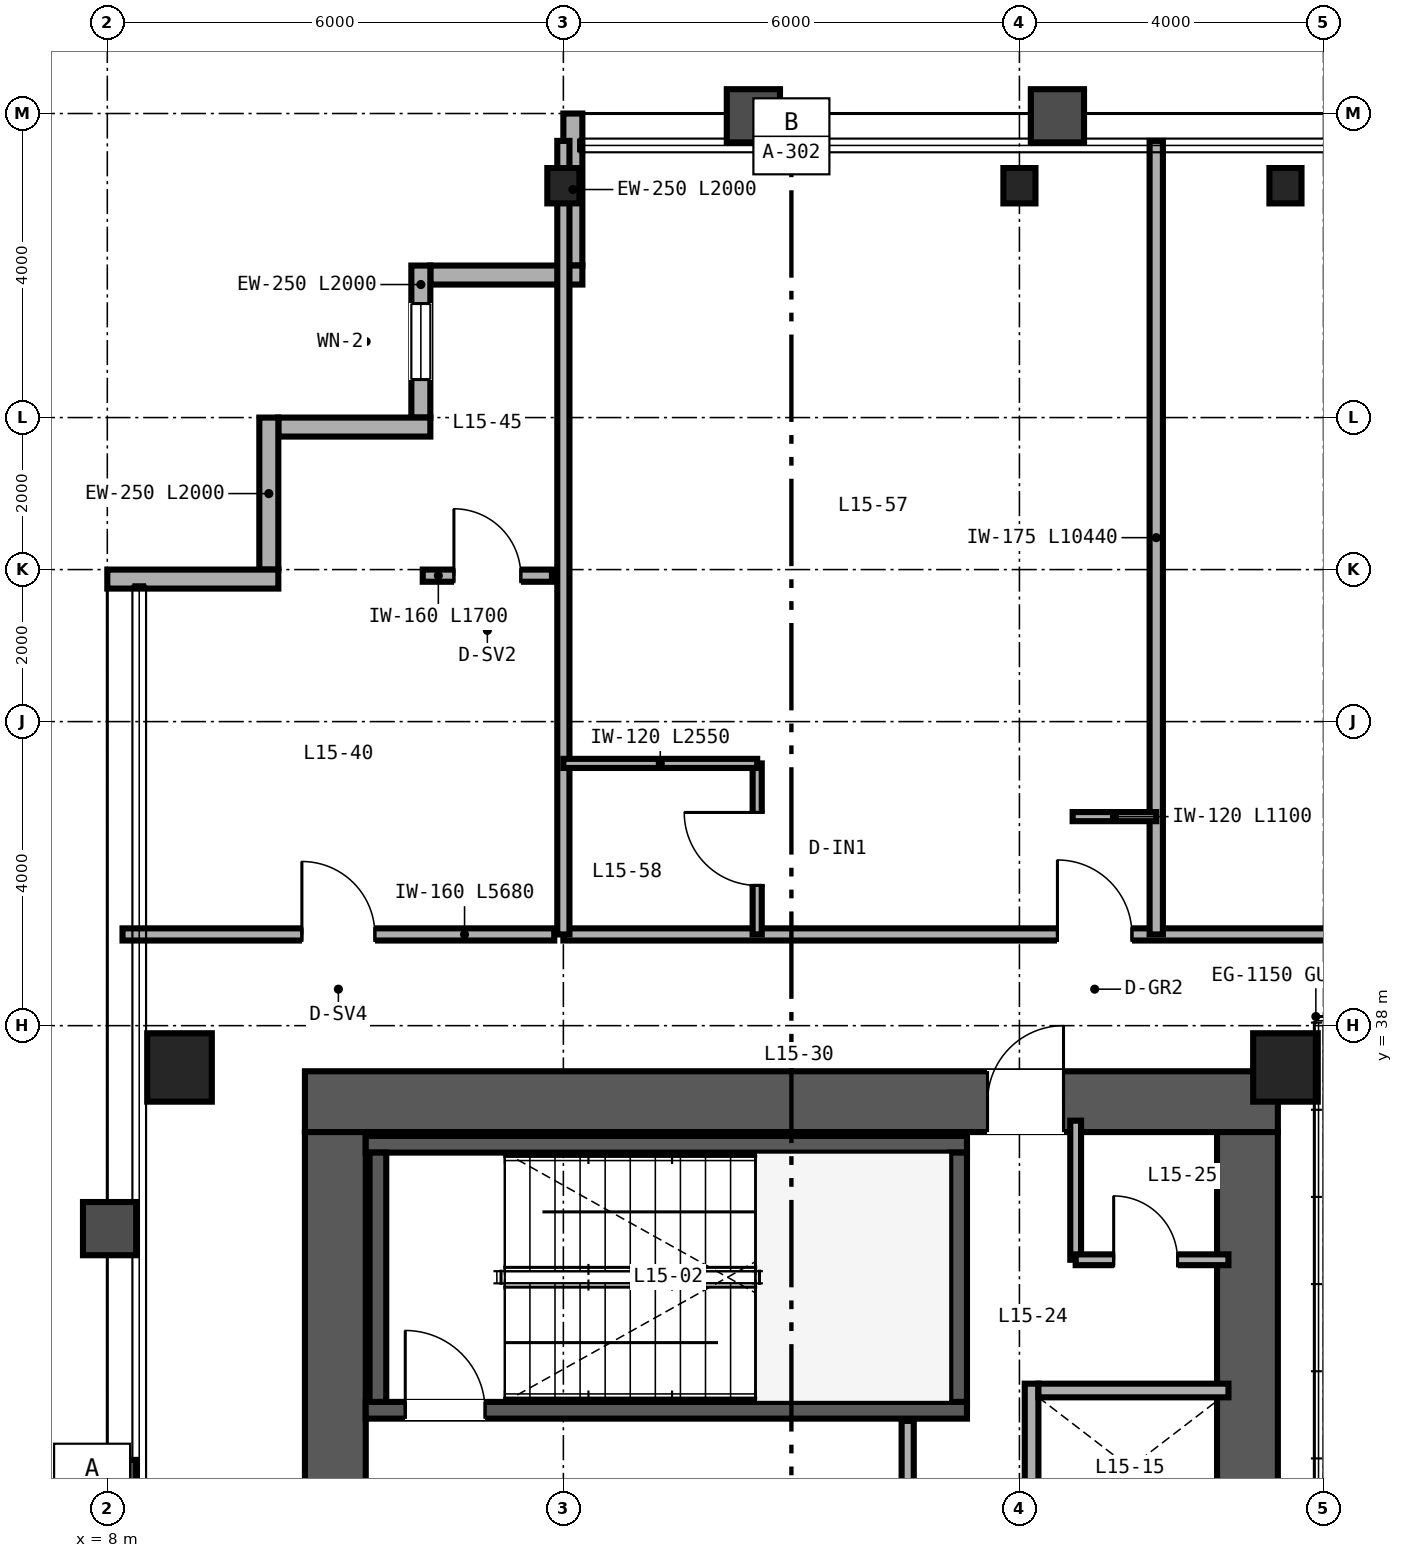
"""IFC4 building model, lengths in metres.
Left out: names, types, materials, properties, quantities, classifications, styles, units other than length and angle.
Written with IfcOpenShell. Run it as: python <this file> out.ifc"""

import sys

from ifc_helpers import new_model, si_unit, direction, frame, frame_2d, origin, origin_2d, place, context, subcontext, project, spatial, rectangle, hollow_rectangle, i_section, extrude, source, transform, mapped, element, fill, save


model = new_model("IFC4")
c1 = context("Model", 3, precision=1e-05, world=origin(), true_north=direction((0.0, 1.0)))
c2 = subcontext(c1, "Body", "Model", "MODEL_VIEW")
j1 = project(units=[si_unit("LENGTHUNIT", "METRE"), si_unit("PLANEANGLEUNIT", "RADIAN")], contexts=[c1])
p1 = place(None, origin())
s1 = spatial("IfcSite", under=j1, at=p1, CompositionType="ELEMENT")
p2 = place(p1, origin())
s2 = spatial("IfcBuilding", under=s1, at=p2, CompositionType="ELEMENT")
p3 = place(p2, frame((0.0, 0.0, 63.6)))
s3 = spatial("IfcBuildingStorey", under=s2, at=p3, CompositionType="ELEMENT", Elevation=63.6)
p4 = place(p3, frame((10.6, 37.0, 0.0), z_axis=(0.0, 0.0, 1.0), x_axis=(1.0, 0.0, 0.0)))
e1 = element("IfcWall", 1, at=p4, inside=s3, PredefinedType="SHEAR", context=c2, shape_type="SweptSolid", body=[
    extrude(rectangle(XDim=12.8, YDim=0.8, at=frame_2d((6.4, 0.0))), origin(), (0.0, 0.0, 1.0), 3.35),
])
p5 = place(p4, frame((8.98, 0.0, 0.0)))
e2 = element("IfcOpeningElement", 2, at=p5, cuts=e1, PredefinedType="OPENING", context=c2, shape_type="SweptSolid", body=[
    extrude(rectangle(XDim=1.0, YDim=2.15, at=frame_2d((0.5, 1.075))), frame((0.0, 0.41, 0.0), z_axis=(0.0, -1.0, 0.0), x_axis=(1.0, 0.0, 0.0)), (0.0, 0.0, 1.0), 0.82),
])
for number, where, z_axis, x_axis in (
    (3, (11.0, 15.4, 0.0), (0.0, 0.0, 1.0), (0.0, 1.0, 0.0)),
    (4, (23.0, 15.4, 0.0), (0.0, 0.0, 1.0), (0.0, 1.0, 0.0)),
):
    element("IfcWall", number, at=place(p3, frame(where, z_axis=z_axis, x_axis=x_axis)), inside=s3, PredefinedType="SHEAR", context=c2, shape_type="SweptSolid", body=[
        extrude(rectangle(XDim=21.2, YDim=0.8, at=frame_2d((10.6, 0.0))), origin(), (0.0, 0.0, 1.0), 3.35),
    ])
p6 = place(p3, frame((11.4, 32.94, 0.0), z_axis=(0.0, 0.0, 1.0), x_axis=(1.0, 0.0, 0.0)))
e5 = element("IfcWall", 5, at=p6, inside=s3, PredefinedType="SHEAR", context=c2, shape_type="SweptSolid", body=[
    extrude(rectangle(XDim=7.91, YDim=0.22, at=frame_2d((3.955, 0.0))), origin(), (0.0, 0.0, 1.0), 3.4),
])
p7 = place(p6, frame((0.52, 0.0, 0.0)))
e6 = element("IfcOpeningElement", 6, at=p7, cuts=e5, PredefinedType="OPENING", context=c2, shape_type="SweptSolid", body=[
    extrude(rectangle(XDim=1.05, YDim=2.15, at=frame_2d((0.525, 1.075))), frame((0.0, 0.12, 0.0), z_axis=(0.0, -1.0, 0.0), x_axis=(1.0, 0.0, 0.0)), (0.0, 0.0, 1.0), 0.24),
])
p8 = place(p3, frame((11.4, 36.44, 0.0), z_axis=(0.0, 0.0, 1.0), x_axis=(1.0, 0.0, 0.0)))
e7 = element("IfcWall", 7, at=p8, inside=s3, PredefinedType="SHEAR", context=c2, shape_type="SweptSolid", body=[
    extrude(rectangle(XDim=7.91, YDim=0.22, at=frame_2d((3.955, 0.0))), origin(), (0.0, 0.0, 1.0), 3.4),
])
for number, where, z_axis, x_axis in (
    (8, (11.56, 33.05, 0.0), (0.0, 0.0, 1.0), (0.0, 1.0, 0.0)),
    (9, (19.2, 33.05, 0.0), (0.0, 0.0, 1.0), (0.0, 1.0, 0.0)),
):
    element("IfcWall", number, at=place(p3, frame(where, z_axis=z_axis, x_axis=x_axis)), inside=s3, PredefinedType="SHEAR", context=c2, shape_type="SweptSolid", body=[
        extrude(rectangle(XDim=3.28, YDim=0.22, at=frame_2d((1.64, 0.0))), origin(), (0.0, 0.0, 1.0), 3.4),
    ])
m1 = source(origin(), c2, "Body", "SweptSolid", [
    extrude(hollow_rectangle(XDim=0.85, YDim=0.9, WallThickness=0.04, at=origin_2d()), origin(), (0.0, 0.0, 1.0), 3.35),
])
for number, where, z_axis, x_axis in (
    (10, (8.95, 37.45, 0.0), (0.0, 0.0, 1.0), (1.0, 0.0, 0.0)),
    (11, (23.5, 37.45, 0.0), (0.0, 0.0, 1.0), (1.0, 0.0, 0.0)),
):
    element("IfcColumn", number, at=place(p3, frame(where, z_axis=z_axis, x_axis=x_axis)), inside=s3, PredefinedType="COLUMN", context=c2, shape_type="MappedRepresentation", body=[
        mapped(m1, transform((0.0, 0.0, 0.0), scale=1.0)),
    ])
m2 = source(origin(), c2, "Body", "SweptSolid", [
    extrude(i_section(OverallWidth=0.422, OverallDepth=0.465, WebThickness=0.045, FlangeThickness=0.073, FilletRadius=0.025, at=origin_2d()), origin(), (0.0, 0.0, 1.0), 3.35),
])
for number, where, z_axis, x_axis in (
    (12, (14.0, 49.05, 0.0), (0.0, 0.0, 1.0), (1.0, 0.0, 0.0)),
    (13, (20.0, 49.05, 0.0), (0.0, 0.0, 1.0), (1.0, 0.0, 0.0)),
    (14, (23.5, 49.05, 0.0), (0.0, 0.0, 1.0), (1.0, 0.0, 0.0)),
):
    element("IfcColumn", number, at=place(p3, frame(where, z_axis=z_axis, x_axis=x_axis)), inside=s3, PredefinedType="COLUMN", context=c2, shape_type="MappedRepresentation", body=[
        mapped(m2, transform((0.0, 0.0, 0.0), scale=1.0)),
    ])
p9 = place(p3, frame((14.125, 50.0, 0.0), z_axis=(0.0, 0.0, 1.0), x_axis=(0.0, -1.0, 0.0)))
e15 = element("IfcWall", 15, at=p9, inside=s3, PredefinedType="SOLIDWALL", context=c2, shape_type="SweptSolid", body=[
    extrude(rectangle(XDim=2.0, YDim=0.25, at=frame_2d((1.0, 0.0))), origin(), (0.0, 0.0, 1.0), 2.657),
])
p10 = place(p3, frame((14.25, 47.875, 0.0), z_axis=(0.0, 0.0, 1.0), x_axis=(-1.0, 0.0, 0.0)))
e16 = element("IfcWall", 16, at=p10, inside=s3, PredefinedType="SOLIDWALL", context=c2, shape_type="SweptSolid", body=[
    extrude(rectangle(XDim=2.0, YDim=0.25, at=frame_2d((1.0, 0.0))), origin(), (0.0, 0.0, 1.0), 3.35),
])
p11 = place(p3, frame((12.125, 48.0, 0.0), z_axis=(0.0, 0.0, 1.0), x_axis=(0.0, -1.0, 0.0)))
e17 = element("IfcWall", 17, at=p11, inside=s3, PredefinedType="SOLIDWALL", context=c2, shape_type="SweptSolid", body=[
    extrude(rectangle(XDim=2.0, YDim=0.25, at=frame_2d((1.0, 0.0))), origin(), (0.0, 0.0, 1.0), 3.35),
])
p12 = place(p11, frame((0.5, 0.0, 0.85)))
e18 = element("IfcOpeningElement", 18, at=p12, cuts=e17, PredefinedType="OPENING", context=c2, shape_type="SweptSolid", body=[
    extrude(rectangle(XDim=1.0, YDim=1.9, at=frame_2d((0.5, 0.95))), frame((0.0, 0.135, 0.0), z_axis=(0.0, -1.0, 0.0), x_axis=(1.0, 0.0, 0.0)), (0.0, 0.0, 1.0), 0.27),
])
for number, where, z_axis, x_axis in (
    (19, (12.25, 45.875, 0.0), (0.0, 0.0, 1.0), (-1.0, 0.0, 0.0)),
    (20, (10.125, 46.0, 0.0), (0.0, 0.0, 1.0), (0.0, -1.0, 0.0)),
):
    element("IfcWall", number, at=place(p3, frame(where, z_axis=z_axis, x_axis=x_axis)), inside=s3, PredefinedType="SOLIDWALL", context=c2, shape_type="SweptSolid", body=[
        extrude(rectangle(XDim=2.0, YDim=0.25, at=frame_2d((1.0, 0.0))), origin(), (0.0, 0.0, 1.0), 3.35),
    ])
p13 = place(p3, frame((10.25, 43.875, 0.0), z_axis=(0.0, 0.0, 1.0), x_axis=(-1.0, 0.0, 0.0)))
e21 = element("IfcWall", 21, at=p13, inside=s3, PredefinedType="SOLIDWALL", context=c2, shape_type="SweptSolid", body=[
    extrude(rectangle(XDim=2.25, YDim=0.25, at=frame_2d((1.125, 0.0))), origin(), (0.0, 0.0, 1.0), 3.35),
])
p14 = place(p3, frame((20.16, 29.0, 0.0), z_axis=(0.0, 0.0, 1.0), x_axis=(0.0, 1.0, 0.0)))
e22 = element("IfcWall", 22, at=p14, inside=s3, PredefinedType="SOLIDWALL", context=c2, shape_type="SweptSolid", body=[
    extrude(rectangle(XDim=4.29, YDim=0.18, at=frame_2d((2.145, 0.0))), origin(), (0.0, 0.0, 1.0), 3.35),
])
p15 = place(p3, frame((20.25, 33.2, 0.0), z_axis=(0.0, 0.0, 1.0), x_axis=(1.0, 0.0, 0.0)))
e23 = element("IfcWall", 23, at=p15, inside=s3, PredefinedType="SOLIDWALL", context=c2, shape_type="SweptSolid", body=[
    extrude(rectangle(XDim=2.5, YDim=0.18, at=frame_2d((1.25, 0.0))), origin(), (0.0, 0.0, 1.0), 3.35),
])
p16 = place(p3, frame((18.53, 28.9, 0.0), z_axis=(0.0, 0.0, 1.0), x_axis=(0.0, 1.0, 0.0)))
e24 = element("IfcWall", 24, at=p16, inside=s3, PredefinedType="PARTITIONING", context=c2, shape_type="SweptSolid", body=[
    extrude(rectangle(XDim=3.9, YDim=0.16, at=frame_2d((1.95, 0.0))), origin(), (0.0, 0.0, 1.0), 3.35),
])
p17 = place(p16, frame((1.5, 0.0, 0.0)))
e25 = element("IfcOpeningElement", 25, at=p17, cuts=e24, PredefinedType="OPENING", context=c2, shape_type="SweptSolid", body=[
    extrude(rectangle(XDim=1.0, YDim=2.15, at=frame_2d((0.5, 1.075))), frame((0.0, 0.09, 0.0), z_axis=(0.0, -1.0, 0.0), x_axis=(1.0, 0.0, 0.0)), (0.0, 0.0, 1.0), 0.18),
])
p18 = place(p3, frame((20.74, 34.92, 0.0), z_axis=(0.0, 0.0, 1.0), x_axis=(0.0, 1.0, 0.0)))
e26 = element("IfcWall", 26, at=p18, inside=s3, PredefinedType="PARTITIONING", context=c2, shape_type="SweptSolid", body=[
    extrude(rectangle(XDim=1.83, YDim=0.142, at=frame_2d((0.915, 0.0))), origin(), (0.0, 0.0, 1.0), 3.35),
])
p19 = place(p3, frame((20.74, 34.92, 0.0), z_axis=(0.0, 0.0, 1.0), x_axis=(1.0, 0.0, 0.0)))
e27 = element("IfcWall", 27, at=p19, inside=s3, PredefinedType="PARTITIONING", context=c2, shape_type="SweptSolid", body=[
    extrude(rectangle(XDim=2.01, YDim=0.142, at=frame_2d((1.005, 0.0))), origin(), (0.0, 0.0, 1.0), 3.35),
])
p20 = place(p19, frame((0.5, 0.0, 0.0)))
e28 = element("IfcOpeningElement", 28, at=p20, cuts=e27, PredefinedType="OPENING", context=c2, shape_type="SweptSolid", body=[
    extrude(rectangle(XDim=0.84, YDim=2.1, at=frame_2d((0.42, 1.05))), frame((0.0, 0.081, 0.0), z_axis=(0.0, -1.0, 0.0), x_axis=(1.0, 0.0, 0.0)), (0.0, 0.0, 1.0), 0.162),
])
p21 = place(p3, frame((8.2, 39.2, 0.0), z_axis=(0.0, 0.0, 1.0), x_axis=(1.0, 0.0, 0.0)))
e29 = element("IfcWall", 29, at=p21, inside=s3, PredefinedType="PARTITIONING", context=c2, shape_type="SweptSolid", body=[
    extrude(rectangle(XDim=5.68, YDim=0.16, at=frame_2d((2.84, 0.0))), origin(), (0.0, 0.0, 1.0), 3.35),
])
p22 = place(p21, frame((2.36, 0.0, 0.0)))
e30 = element("IfcOpeningElement", 30, at=p22, cuts=e29, PredefinedType="OPENING", context=c2, shape_type="SweptSolid", body=[
    extrude(rectangle(XDim=0.96, YDim=2.15, at=frame_2d((0.48, 1.075))), frame((0.0, 0.09, 0.0), z_axis=(0.0, -1.0, 0.0), x_axis=(1.0, 0.0, 0.0)), (0.0, 0.0, 1.0), 0.18),
])
p23 = place(p3, frame((12.15, 43.92, 0.0), z_axis=(0.0, 0.0, 1.0), x_axis=(1.0, 0.0, 0.0)))
e31 = element("IfcWall", 31, at=p23, inside=s3, PredefinedType="PARTITIONING", context=c2, shape_type="SweptSolid", body=[
    extrude(rectangle(XDim=1.7, YDim=0.16, at=frame_2d((0.85, 0.0))), origin(), (0.0, 0.0, 1.0), 3.35),
])
p24 = place(p23, frame((0.41, 0.0, 0.0)))
e32 = element("IfcOpeningElement", 32, at=p24, cuts=e31, PredefinedType="OPENING", context=c2, shape_type="SweptSolid", body=[
    extrude(rectangle(XDim=0.88, YDim=2.15, at=frame_2d((0.44, 1.075))), frame((0.0, 0.09, 0.0), z_axis=(0.0, -1.0, 0.0), x_axis=(1.0, 0.0, 0.0)), (0.0, 0.0, 1.0), 0.18),
])
p25 = place(p3, frame((14.0, 39.2, 0.0), z_axis=(0.0, 0.0, 1.0), x_axis=(1.0, 0.0, 0.0)))
e33 = element("IfcWall", 33, at=p25, inside=s3, PredefinedType="PARTITIONING", context=c2, shape_type="SweptSolid", body=[
    extrude(rectangle(XDim=36.0, YDim=0.16, at=frame_2d((18.0, 0.0))), origin(), (0.0, 0.0, 1.0), 2.571),
])
p26 = place(p25, frame((6.5, 0.0, 0.0)))
e34 = element("IfcOpeningElement", 34, at=p26, cuts=e33, PredefinedType="OPENING", context=c2, shape_type="SweptSolid", body=[
    extrude(rectangle(XDim=0.98, YDim=2.2, at=frame_2d((0.49, 1.1))), frame((0.0, 0.09, 0.0), z_axis=(0.0, -1.0, 0.0), x_axis=(1.0, 0.0, 0.0)), (0.0, 0.0, 1.0), 0.18),
])
p27 = place(p25, frame((11.22, 0.0, 0.0)))
e35 = element("IfcOpeningElement", 35, at=p27, cuts=e33, PredefinedType="OPENING", context=c2, shape_type="SweptSolid", body=[
    extrude(rectangle(XDim=0.96, YDim=2.15, at=frame_2d((0.48, 1.075))), frame((0.0, 0.09, 0.0), z_axis=(0.0, -1.0, 0.0), x_axis=(1.0, 0.0, 0.0)), (0.0, 0.0, 1.0), 0.18),
])
p28 = place(p25, frame((22.1, 0.0, 0.0)))
e36 = element("IfcOpeningElement", 36, at=p28, cuts=e33, PredefinedType="OPENING", context=c2, shape_type="SweptSolid", body=[
    extrude(rectangle(XDim=0.98, YDim=2.2, at=frame_2d((0.49, 1.1))), frame((0.0, 0.09, 0.0), z_axis=(0.0, -1.0, 0.0), x_axis=(1.0, 0.0, 0.0)), (0.0, 0.0, 1.0), 0.18),
])
p29 = place(p25, frame((28.94, 0.0, 0.0)))
e37 = element("IfcOpeningElement", 37, at=p29, cuts=e33, PredefinedType="OPENING", context=c2, shape_type="SweptSolid", body=[
    extrude(rectangle(XDim=0.94, YDim=2.15, at=frame_2d((0.47, 1.075))), frame((0.0, 0.09, 0.0), z_axis=(0.0, -1.0, 0.0), x_axis=(1.0, 0.0, 0.0)), (0.0, 0.0, 1.0), 0.18),
])
p30 = place(p25, frame((34.74, 0.0, 0.0)))
e38 = element("IfcOpeningElement", 38, at=p30, cuts=e33, PredefinedType="OPENING", context=c2, shape_type="SweptSolid", body=[
    extrude(rectangle(XDim=0.94, YDim=2.15, at=frame_2d((0.47, 1.075))), frame((0.0, 0.09, 0.0), z_axis=(0.0, -1.0, 0.0), x_axis=(1.0, 0.0, 0.0)), (0.0, 0.0, 1.0), 0.18),
])
p31 = place(p3, frame((14.0, 39.2, 0.0), z_axis=(0.0, 0.0, 1.0), x_axis=(0.0, 1.0, 0.0)))
e39 = element("IfcWall", 39, at=p31, inside=s3, PredefinedType="PARTITIONING", context=c2, shape_type="SweptSolid", body=[
    extrude(rectangle(XDim=10.44, YDim=0.16, at=frame_2d((5.22, 0.0))), origin(), (0.0, 0.0, 1.0), 2.657),
])
p32 = place(p3, frame((21.8, 39.2, 0.0), z_axis=(0.0, 0.0, 1.0), x_axis=(0.0, 1.0, 0.0)))
e40 = element("IfcWall", 40, at=p32, inside=s3, PredefinedType="PARTITIONING", context=c2, shape_type="SweptSolid", body=[
    extrude(rectangle(XDim=10.44, YDim=0.175, at=frame_2d((5.22, 0.0))), origin(), (0.0, 0.0, 1.0), 2.813),
])
p33 = place(p3, frame((16.55, 39.2, 0.0), z_axis=(0.0, 0.0, 1.0), x_axis=(0.0, 1.0, 0.0)))
e41 = element("IfcWall", 41, at=p33, inside=s3, PredefinedType="PARTITIONING", context=c2, shape_type="SweptSolid", body=[
    extrude(rectangle(XDim=2.25, YDim=0.12, at=frame_2d((1.125, 0.0))), origin(), (0.0, 0.0, 1.0), 3.35),
])
p34 = place(p33, frame((0.645, 0.0, 0.0)))
e42 = element("IfcOpeningElement", 42, at=p34, cuts=e41, PredefinedType="OPENING", context=c2, shape_type="SweptSolid", body=[
    extrude(rectangle(XDim=0.96, YDim=2.15, at=frame_2d((0.48, 1.075))), frame((0.0, 0.07, 0.0), z_axis=(0.0, -1.0, 0.0), x_axis=(1.0, 0.0, 0.0)), (0.0, 0.0, 1.0), 0.14),
])
p35 = place(p3, frame((14.0, 41.45, 0.0), z_axis=(0.0, 0.0, 1.0), x_axis=(1.0, 0.0, 0.0)))
e43 = element("IfcWall", 43, at=p35, inside=s3, PredefinedType="PARTITIONING", context=c2, shape_type="SweptSolid", body=[
    extrude(rectangle(XDim=2.55, YDim=0.12, at=frame_2d((1.275, 0.0))), origin(), (0.0, 0.0, 1.0), 3.35),
])
p36 = place(p3, frame((20.7, 40.75, 0.0), z_axis=(0.0, 0.0, 1.0), x_axis=(1.0, 0.0, 0.0)))
e44 = element("IfcWall", 44, at=p36, inside=s3, PredefinedType="PARTITIONING", context=c2, shape_type="SweptSolid", body=[
    extrude(rectangle(XDim=1.1, YDim=0.12, at=frame_2d((0.55, 0.0))), origin(), (0.0, 0.0, 1.0), 3.35),
])
m3 = source(origin(), c2, "Body", "SweptSolid", [
    extrude(rectangle(XDim=1.0, YDim=1.9, at=frame_2d((0.5, 0.95))), frame((0.0, 0.03, 0.0), z_axis=(0.0, -1.0, 0.0), x_axis=(1.0, 0.0, 0.0)), (0.0, 0.0, 1.0), 0.06),
])
p37 = place(p12, origin())
e45 = element("IfcWindow", 45, at=p37, inside=s3, PartitioningType="SINGLE_PANEL", PredefinedType="WINDOW", context=c2, shape_type="MappedRepresentation", body=[
    mapped(m3, transform((0.0, 0.0, 0.0), scale=1.0)),
])
fill(e18, e45)
m4 = source(origin(), c2, "Body", "SweptSolid", [
    extrude(rectangle(XDim=1.05, YDim=2.15, at=frame_2d((0.525, 1.075))), frame((0.0, 0.025, 0.0), z_axis=(0.0, -1.0, 0.0), x_axis=(1.0, 0.0, 0.0)), (0.0, 0.0, 1.0), 0.05),
])
p38 = place(p7, origin())
e46 = element("IfcDoor", 46, at=p38, inside=s3, OperationType="SINGLE_SWING_LEFT", PredefinedType="DOOR", context=c2, shape_type="MappedRepresentation", body=[
    mapped(m4, transform((0.0, 0.0, 0.0), scale=1.0)),
])
fill(e6, e46)
m5 = source(origin(), c2, "Body", "SweptSolid", [
    extrude(rectangle(XDim=0.84, YDim=2.1, at=frame_2d((0.42, 1.05))), frame((0.0, 0.025, 0.0), z_axis=(0.0, -1.0, 0.0), x_axis=(1.0, 0.0, 0.0)), (0.0, 0.0, 1.0), 0.05),
])
p39 = place(p20, origin())
e47 = element("IfcDoor", 47, at=p39, inside=s3, OperationType="SINGLE_SWING_LEFT", PredefinedType="DOOR", context=c2, shape_type="MappedRepresentation", body=[
    mapped(m5, transform((0.0, 0.0, 0.0), scale=1.0)),
])
fill(e28, e47)
m6 = source(origin(), c2, "Body", "SweptSolid", [
    extrude(rectangle(XDim=1.0, YDim=2.15, at=frame_2d((0.5, 1.075))), frame((0.0, 0.025, 0.0), z_axis=(0.0, -1.0, 0.0), x_axis=(1.0, 0.0, 0.0)), (0.0, 0.0, 1.0), 0.05),
])
p40 = place(p5, origin())
e48 = element("IfcDoor", 48, at=p40, inside=s3, OperationType="SINGLE_SWING_RIGHT", PredefinedType="DOOR", context=c2, shape_type="MappedRepresentation", body=[
    mapped(m6, transform((0.0, 0.0, 0.0), scale=1.0)),
])
fill(e2, e48)
m7 = source(origin(), c2, "Body", "SweptSolid", [
    extrude(rectangle(XDim=0.96, YDim=2.15, at=frame_2d((0.48, 1.075))), frame((0.0, 0.025, 0.0), z_axis=(0.0, -1.0, 0.0), x_axis=(1.0, 0.0, 0.0)), (0.0, 0.0, 1.0), 0.05),
])
p41 = place(p22, origin())
e49 = element("IfcDoor", 49, at=p41, inside=s3, OperationType="SINGLE_SWING_LEFT", PredefinedType="DOOR", context=c2, shape_type="MappedRepresentation", body=[
    mapped(m7, transform((0.0, 0.0, 0.0), scale=1.0)),
])
fill(e30, e49)
m8 = source(origin(), c2, "Body", "SweptSolid", [
    extrude(rectangle(XDim=0.88, YDim=2.15, at=frame_2d((0.44, 1.075))), frame((0.0, 0.025, 0.0), z_axis=(0.0, -1.0, 0.0), x_axis=(1.0, 0.0, 0.0)), (0.0, 0.0, 1.0), 0.05),
])
p42 = place(p24, origin())
e50 = element("IfcDoor", 50, at=p42, inside=s3, OperationType="SINGLE_SWING_LEFT", PredefinedType="DOOR", context=c2, shape_type="MappedRepresentation", body=[
    mapped(m8, transform((0.0, 0.0, 0.0), scale=1.0)),
])
fill(e32, e50)
p43 = place(p34, origin())
e51 = element("IfcDoor", 51, at=p43, inside=s3, OperationType="SINGLE_SWING_RIGHT", PredefinedType="DOOR", context=c2, shape_type="MappedRepresentation", body=[
    mapped(m7, transform((0.0, 0.0, 0.0), scale=1.0)),
])
fill(e42, e51)
m9 = source(origin(), c2, "Body", "SweptSolid", [
    extrude(rectangle(XDim=0.98, YDim=2.2, at=frame_2d((0.49, 1.1))), frame((0.0, 0.025, 0.0), z_axis=(0.0, -1.0, 0.0), x_axis=(1.0, 0.0, 0.0)), (0.0, 0.0, 1.0), 0.05),
])
p44 = place(p26, origin())
e52 = element("IfcDoor", 52, at=p44, inside=s3, OperationType="SINGLE_SWING_LEFT", PredefinedType="DOOR", context=c2, shape_type="MappedRepresentation", body=[
    mapped(m9, transform((0.0, 0.0, 0.0), scale=1.0)),
])
fill(e34, e52)
save(model, sys.argv[1])
